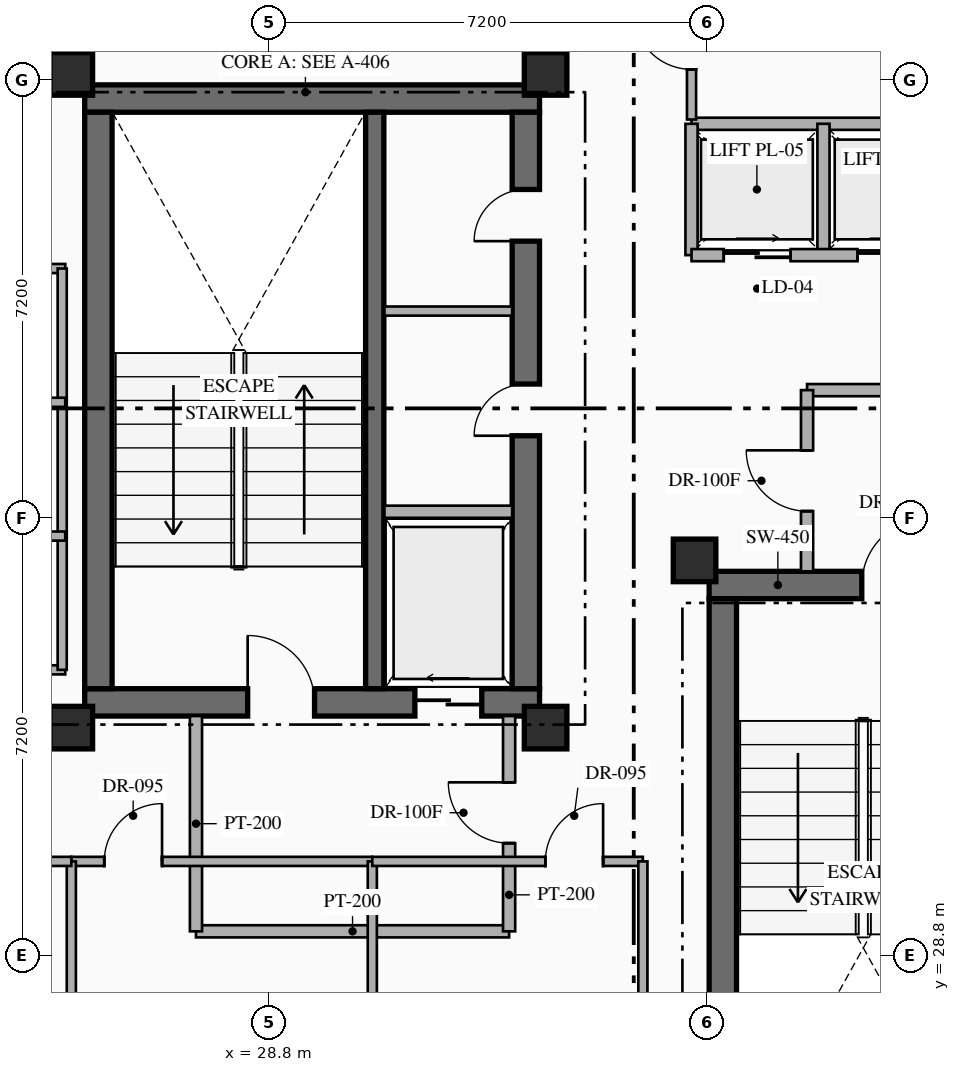
"""IFC4 building model, lengths in metres.
Left out: names, types, materials, properties, quantities, classifications, styles, units other than length and angle.
Written with IfcOpenShell. Run it as: python <this file> out.ifc"""

import sys

from ifc_helpers import new_model, si_unit, direction, frame, frame_2d, origin, origin_2d, place, context, subcontext, project, spatial, rectangle, hollow_rectangle, extrude, element, fill, save


model = new_model("IFC4")
c1 = context("Model", 3, precision=1e-05, world=origin(), true_north=direction((0.0, 1.0)))
c2 = subcontext(c1, "Body", "Model", "MODEL_VIEW")
j1 = project(units=[si_unit("LENGTHUNIT", "METRE"), si_unit("PLANEANGLEUNIT", "RADIAN")], contexts=[c1])
p1 = place(None, origin())
s1 = spatial("IfcSite", under=j1, at=p1, CompositionType="ELEMENT")
p2 = place(p1, origin())
s2 = spatial("IfcBuilding", under=s1, at=p2, CompositionType="ELEMENT")
p3 = place(p2, frame((0.0, 0.0, 223.95)))
s3 = spatial("IfcBuildingStorey", under=s2, at=p3, CompositionType="ELEMENT", Elevation=223.95)
p4 = place(p3, frame((25.77, 32.965, 0.0), z_axis=(0.0, 0.0, 1.0), x_axis=(1.0, 0.0, 0.0)))
e1 = element("IfcWall", 1, at=p4, inside=s3, PredefinedType="SHEAR", context=c2, shape_type="SweptSolid", body=[
    extrude(rectangle(XDim=7.48, YDim=0.45, at=frame_2d((3.74, 0.0))), origin(), (0.0, 0.0, 1.0), 3.6),
])
p5 = place(p4, frame((2.68, 0.0, 0.0)))
e2 = element("IfcOpeningElement", 2, at=p5, cuts=e1, PredefinedType="OPENING", context=c2, shape_type="SweptSolid", body=[
    extrude(rectangle(XDim=1.1, YDim=2.2, at=frame_2d((0.55, 1.1))), frame((0.0, 0.235, 0.0), z_axis=(0.0, -1.0, 0.0), x_axis=(1.0, 0.0, 0.0)), (0.0, 0.0, 1.0), 0.47),
])
p6 = place(p4, frame((5.43, 0.0, 0.0)))
e3 = element("IfcOpeningElement", 3, at=p6, cuts=e1, PredefinedType="OPENING", context=c2, shape_type="SweptSolid", body=[
    extrude(rectangle(XDim=1.1, YDim=2.15, at=frame_2d((0.55, 1.075))), frame((0.0, 0.235, 0.0), z_axis=(0.0, -1.0, 0.0), x_axis=(1.0, 0.0, 0.0)), (0.0, 0.0, 1.0), 0.47),
])
p7 = place(p3, frame((25.77, 42.895, 0.0), z_axis=(0.0, 0.0, 1.0), x_axis=(1.0, 0.0, 0.0)))
e4 = element("IfcWall", 4, at=p7, inside=s3, PredefinedType="SHEAR", context=c2, shape_type="SweptSolid", body=[
    extrude(rectangle(XDim=7.48, YDim=0.45, at=frame_2d((3.74, 0.0))), origin(), (0.0, 0.0, 1.0), 3.6),
])
p8 = place(p3, frame((25.995, 33.19, 0.0), z_axis=(0.0, 0.0, 1.0), x_axis=(0.0, 1.0, 0.0)))
e5 = element("IfcWall", 5, at=p8, inside=s3, PredefinedType="SHEAR", context=c2, shape_type="SweptSolid", body=[
    extrude(rectangle(XDim=9.48, YDim=0.45, at=frame_2d((4.74, 0.0))), origin(), (0.0, 0.0, 1.0), 3.6),
])
p9 = place(p3, frame((33.025, 33.19, 0.0), z_axis=(0.0, 0.0, 1.0), x_axis=(0.0, 1.0, 0.0)))
e6 = element("IfcWall", 6, at=p9, inside=s3, PredefinedType="SHEAR", context=c2, shape_type="SweptSolid", body=[
    extrude(rectangle(XDim=9.48, YDim=0.45, at=frame_2d((4.74, 0.0))), origin(), (0.0, 0.0, 1.0), 3.6),
])
p10 = place(p9, frame((4.16, 0.0, 0.0)))
e7 = element("IfcOpeningElement", 7, at=p10, cuts=e6, PredefinedType="OPENING", context=c2, shape_type="SweptSolid", body=[
    extrude(rectangle(XDim=0.85, YDim=2.08, at=frame_2d((0.425, 1.04))), frame((0.0, 0.235, 0.0), z_axis=(0.0, -1.0, 0.0), x_axis=(1.0, 0.0, 0.0)), (0.0, 0.0, 1.0), 0.47),
])
p11 = place(p9, frame((7.36, 0.0, 0.0)))
e8 = element("IfcOpeningElement", 8, at=p11, cuts=e6, PredefinedType="OPENING", context=c2, shape_type="SweptSolid", body=[
    extrude(rectangle(XDim=0.85, YDim=2.08, at=frame_2d((0.425, 1.04))), frame((0.0, 0.235, 0.0), z_axis=(0.0, -1.0, 0.0), x_axis=(1.0, 0.0, 0.0)), (0.0, 0.0, 1.0), 0.47),
])
p12 = place(p3, frame((30.54, 33.19, 0.0), z_axis=(0.0, 0.0, 1.0), x_axis=(0.0, 1.0, 0.0)))
e9 = element("IfcWall", 9, at=p12, inside=s3, PredefinedType="SHEAR", context=c2, shape_type="SweptSolid", body=[
    extrude(rectangle(XDim=9.48, YDim=0.3, at=frame_2d((4.74, 0.0))), origin(), (0.0, 0.0, 1.0), 3.6),
])
p13 = place(p3, frame((36.04, 34.895, 0.0), z_axis=(0.0, 0.0, 1.0), x_axis=(1.0, 0.0, 0.0)))
e10 = element("IfcWall", 10, at=p13, inside=s3, PredefinedType="SHEAR", context=c2, shape_type="SweptSolid", body=[
    extrude(rectangle(XDim=7.46, YDim=0.45, at=frame_2d((3.73, 0.0))), origin(), (0.0, 0.0, 1.0), 3.6),
])
p14 = place(p13, frame((2.51, 0.0, 0.0)))
e11 = element("IfcOpeningElement", 11, at=p14, cuts=e10, PredefinedType="OPENING", context=c2, shape_type="SweptSolid", body=[
    extrude(rectangle(XDim=1.1, YDim=2.2, at=frame_2d((0.55, 1.1))), frame((0.0, 0.235, 0.0), z_axis=(0.0, -1.0, 0.0), x_axis=(1.0, 0.0, 0.0)), (0.0, 0.0, 1.0), 0.47),
])
p15 = place(p13, frame((5.41, 0.0, 0.0)))
e12 = element("IfcOpeningElement", 12, at=p15, cuts=e10, PredefinedType="OPENING", context=c2, shape_type="SweptSolid", body=[
    extrude(rectangle(XDim=1.12, YDim=2.15, at=frame_2d((0.56, 1.075))), frame((0.0, 0.235, 0.0), z_axis=(0.0, -1.0, 0.0), x_axis=(1.0, 0.0, 0.0)), (0.0, 0.0, 1.0), 0.47),
])
p16 = place(p3, frame((36.265, 25.19, 0.0), z_axis=(0.0, 0.0, 1.0), x_axis=(0.0, 1.0, 0.0)))
e13 = element("IfcWall", 13, at=p16, inside=s3, PredefinedType="SHEAR", context=c2, shape_type="SweptSolid", body=[
    extrude(rectangle(XDim=9.48, YDim=0.45, at=frame_2d((4.74, 0.0))), origin(), (0.0, 0.0, 1.0), 3.6),
])
for number, where, z_axis, x_axis in (
    (14, (25.55, 32.55, 0.0), (0.0, 0.0, 1.0), (1.0, 0.0, 0.0)),
    (15, (33.35, 32.55, 0.0), (0.0, 0.0, 1.0), (1.0, 0.0, 0.0)),
    (16, (25.55, 43.3, 0.0), (0.0, 0.0, 1.0), (1.0, 0.0, 0.0)),
    (17, (33.35, 43.3, 0.0), (0.0, 0.0, 1.0), (1.0, 0.0, 0.0)),
    (18, (35.8, 35.3, 0.0), (0.0, 0.0, 1.0), (1.0, 0.0, 0.0)),
):
    element("IfcColumn", number, at=place(p3, frame(where, z_axis=z_axis, x_axis=x_axis)), inside=s3, PredefinedType="COLUMN", context=c2, shape_type="SweptSolid", body=[
        extrude(hollow_rectangle(XDim=0.7, YDim=0.7, WallThickness=0.028, at=origin_2d()), origin(), (0.0, 0.0, 1.0), 3.6),
    ])
p17 = place(p3, frame((30.7, 36.1, 0.0), z_axis=(0.0, 0.0, 1.0), x_axis=(1.0, 0.0, 0.0)))
e19 = element("IfcWall", 19, at=p17, inside=s3, PredefinedType="STANDARD", context=c2, shape_type="SweptSolid", body=[
    extrude(rectangle(XDim=2.1, YDim=0.2, at=frame_2d((1.05, 0.0))), origin(), (0.0, 0.0, 1.0), 3.35),
])
p18 = place(p3, frame((30.7, 39.4, 0.0), z_axis=(0.0, 0.0, 1.0), x_axis=(1.0, 0.0, 0.0)))
e20 = element("IfcWall", 20, at=p18, inside=s3, PredefinedType="PARTITIONING", context=c2, shape_type="SweptSolid", body=[
    extrude(rectangle(XDim=2.1, YDim=0.15, at=frame_2d((1.05, 0.0))), origin(), (0.0, 0.0, 1.0), 3.35),
])
p19 = place(p3, frame((27.6, 29.2, 0.0), z_axis=(0.0, 0.0, 1.0), x_axis=(1.0, 0.0, 0.0)))
e21 = element("IfcWall", 21, at=p19, inside=s3, PredefinedType="STANDARD", context=c2, shape_type="SweptSolid", body=[
    extrude(rectangle(XDim=5.15, YDim=0.2, at=frame_2d((2.575, 0.0))), origin(), (0.0, 0.0, 1.0), 3.35),
])
p20 = place(p3, frame((27.6, 29.2, 0.0), z_axis=(0.0, 0.0, 1.0), x_axis=(0.0, 1.0, 0.0)))
e22 = element("IfcWall", 22, at=p20, inside=s3, PredefinedType="STANDARD", context=c2, shape_type="SweptSolid", body=[
    extrude(rectangle(XDim=3.54, YDim=0.2, at=frame_2d((1.77, 0.0))), origin(), (0.0, 0.0, 1.0), 3.35),
])
p21 = place(p3, frame((32.75, 29.2, 0.0), z_axis=(0.0, 0.0, 1.0), x_axis=(0.0, 1.0, 0.0)))
e23 = element("IfcWall", 23, at=p21, inside=s3, PredefinedType="STANDARD", context=c2, shape_type="SweptSolid", body=[
    extrude(rectangle(XDim=3.54, YDim=0.2, at=frame_2d((1.77, 0.0))), origin(), (0.0, 0.0, 1.0), 3.35),
])
p22 = place(p21, frame((1.45, 0.0, 0.0)))
e24 = element("IfcOpeningElement", 24, at=p22, cuts=e23, PredefinedType="OPENING", context=c2, shape_type="SweptSolid", body=[
    extrude(rectangle(XDim=1.0, YDim=2.2, at=frame_2d((0.5, 1.1))), frame((0.0, 0.11, 0.0), z_axis=(0.0, -1.0, 0.0), x_axis=(1.0, 0.0, 0.0)), (0.0, 0.0, 1.0), 0.22),
])
p23 = place(p3, frame((37.65, 38.1, 0.0), z_axis=(0.0, 0.0, 1.0), x_axis=(1.0, 0.0, 0.0)))
e25 = element("IfcWall", 25, at=p23, inside=s3, PredefinedType="STANDARD", context=c2, shape_type="SweptSolid", body=[
    extrude(rectangle(XDim=5.3, YDim=0.2, at=frame_2d((2.65, 0.0))), origin(), (0.0, 0.0, 1.0), 3.35),
])
p24 = place(p3, frame((37.65, 35.12, 0.0), z_axis=(0.0, 0.0, 1.0), x_axis=(0.0, 1.0, 0.0)))
e26 = element("IfcWall", 26, at=p24, inside=s3, PredefinedType="STANDARD", context=c2, shape_type="SweptSolid", body=[
    extrude(rectangle(XDim=2.98, YDim=0.2, at=frame_2d((1.49, 0.0))), origin(), (0.0, 0.0, 1.0), 3.35),
])
p25 = place(p24, frame((0.99, 0.0, 0.0)))
e27 = element("IfcOpeningElement", 27, at=p25, cuts=e26, PredefinedType="OPENING", context=c2, shape_type="SweptSolid", body=[
    extrude(rectangle(XDim=1.0, YDim=2.2, at=frame_2d((0.5, 1.1))), frame((0.0, 0.11, 0.0), z_axis=(0.0, -1.0, 0.0), x_axis=(1.0, 0.0, 0.0)), (0.0, 0.0, 1.0), 0.22),
])
p26 = place(p3, frame((35.75, 42.48, 0.0), z_axis=(0.0, 0.0, 1.0), x_axis=(1.0, 0.0, 0.0)))
e28 = element("IfcWall", 28, at=p26, inside=s3, PredefinedType="STANDARD", context=c2, shape_type="SweptSolid", body=[
    extrude(rectangle(XDim=9.11, YDim=0.2, at=frame_2d((4.555, 0.0))), origin(), (0.0, 0.0, 1.0), 3.35),
])
for number, where, z_axis, x_axis in (
    (29, (35.75, 40.32, 0.0), (0.0, 0.0, 1.0), (0.0, 1.0, 0.0)),
    (30, (37.92, 40.32, 0.0), (0.0, 0.0, 1.0), (0.0, 1.0, 0.0)),
):
    element("IfcWall", number, at=place(p3, frame(where, z_axis=z_axis, x_axis=x_axis)), inside=s3, PredefinedType="STANDARD", context=c2, shape_type="SweptSolid", body=[
        extrude(rectangle(XDim=2.16, YDim=0.2, at=frame_2d((1.08, 0.0))), origin(), (0.0, 0.0, 1.0), 3.35),
    ])
p27 = place(p3, frame((35.75, 40.32, 0.0), z_axis=(0.0, 0.0, 1.0), x_axis=(1.0, 0.0, 0.0)))
e31 = element("IfcWall", 31, at=p27, inside=s3, PredefinedType="STANDARD", context=c2, shape_type="SweptSolid", body=[
    extrude(rectangle(XDim=9.11, YDim=0.2, at=frame_2d((4.555, 0.0))), origin(), (0.0, 0.0, 1.0), 3.35),
])
p28 = place(p27, frame((0.53, 0.0, 0.0)))
e32 = element("IfcOpeningElement", 32, at=p28, cuts=e31, PredefinedType="OPENING", context=c2, shape_type="SweptSolid", body=[
    extrude(rectangle(XDim=1.1, YDim=2.18, at=frame_2d((0.55, 1.09))), frame((0.0, 0.11, 0.0), z_axis=(0.0, -1.0, 0.0), x_axis=(1.0, 0.0, 0.0)), (0.0, 0.0, 1.0), 0.22),
])
p29 = place(p27, frame((2.73, 0.0, 0.0)))
e33 = element("IfcOpeningElement", 33, at=p29, cuts=e31, PredefinedType="OPENING", context=c2, shape_type="SweptSolid", body=[
    extrude(rectangle(XDim=1.1, YDim=2.18, at=frame_2d((0.55, 1.09))), frame((0.0, 0.11, 0.0), z_axis=(0.0, -1.0, 0.0), x_axis=(1.0, 0.0, 0.0)), (0.0, 0.0, 1.0), 0.22),
])
p30 = place(p27, frame((4.93, 0.0, 0.0)))
e34 = element("IfcOpeningElement", 34, at=p30, cuts=e31, PredefinedType="OPENING", context=c2, shape_type="SweptSolid", body=[
    extrude(rectangle(XDim=1.1, YDim=2.18, at=frame_2d((0.55, 1.09))), frame((0.0, 0.11, 0.0), z_axis=(0.0, -1.0, 0.0), x_axis=(1.0, 0.0, 0.0)), (0.0, 0.0, 1.0), 0.22),
])
p31 = place(p27, frame((7.13, 0.0, 0.0)))
e35 = element("IfcOpeningElement", 35, at=p31, cuts=e31, PredefinedType="OPENING", context=c2, shape_type="SweptSolid", body=[
    extrude(rectangle(XDim=1.1, YDim=2.18, at=frame_2d((0.55, 1.09))), frame((0.0, 0.11, 0.0), z_axis=(0.0, -1.0, 0.0), x_axis=(1.0, 0.0, 0.0)), (0.0, 0.0, 1.0), 0.22),
])
for number, where, z_axis, x_axis in (
    (36, (22.15, 33.5, 0.0), (0.0, 0.0, 1.0), (1.0, 0.0, 0.0)),
    (37, (22.15, 40.1, 0.0), (0.0, 0.0, 1.0), (1.0, 0.0, 0.0)),
):
    element("IfcWall", number, at=place(p3, frame(where, z_axis=z_axis, x_axis=x_axis)), inside=s3, PredefinedType="PARTITIONING", context=c2, shape_type="SweptSolid", body=[
        extrude(rectangle(XDim=3.3, YDim=0.15, at=frame_2d((1.65, 0.0))), origin(), (0.0, 0.0, 1.0), 3.35),
    ])
p32 = place(p3, frame((25.4, 33.5, 0.0), z_axis=(0.0, 0.0, 1.0), x_axis=(0.0, 1.0, 0.0)))
e38 = element("IfcWall", 38, at=p32, inside=s3, PredefinedType="PARTITIONING", context=c2, shape_type="SweptSolid", body=[
    extrude(rectangle(XDim=6.6, YDim=0.15, at=frame_2d((3.3, 0.0))), origin(), (0.0, 0.0, 1.0), 3.35),
])
for number, where, z_axis, x_axis in (
    (39, (22.15, 35.7, 0.0), (0.0, 0.0, 1.0), (1.0, 0.0, 0.0)),
    (40, (22.15, 37.9, 0.0), (0.0, 0.0, 1.0), (1.0, 0.0, 0.0)),
):
    element("IfcWall", number, at=place(p3, frame(where, z_axis=z_axis, x_axis=x_axis)), inside=s3, PredefinedType="PARTITIONING", context=c2, shape_type="SweptSolid", body=[
        extrude(rectangle(XDim=3.3, YDim=0.15, at=frame_2d((1.65, 0.0))), origin(), (0.0, 0.0, 1.0), 3.35),
    ])
p33 = place(p3, frame((25.55, 30.35, 0.0), z_axis=(0.0, 0.0, 1.0), x_axis=(1.0, 0.0, 0.0)))
e41 = element("IfcWall", 41, at=p33, inside=s3, PredefinedType="PARTITIONING", context=c2, shape_type="SweptSolid", body=[
    extrude(rectangle(XDim=4.95, YDim=0.15, at=frame_2d((2.475, 0.0))), origin(), (0.0, 0.0, 1.0), 3.35),
])
p34 = place(p33, frame((0.542, 0.0, 0.0)))
e42 = element("IfcOpeningElement", 42, at=p34, cuts=e41, PredefinedType="OPENING", context=c2, shape_type="SweptSolid", body=[
    extrude(rectangle(XDim=0.95, YDim=2.15, at=frame_2d((0.475, 1.075))), frame((0.0, 0.085, 0.0), z_axis=(0.0, -1.0, 0.0), x_axis=(1.0, 0.0, 0.0)), (0.0, 0.0, 1.0), 0.17),
])
p35 = place(p3, frame((25.55, 23.2, 0.0), z_axis=(0.0, 0.0, 1.0), x_axis=(0.0, 1.0, 0.0)))
e43 = element("IfcWall", 43, at=p35, inside=s3, PredefinedType="PARTITIONING", context=c2, shape_type="SweptSolid", body=[
    extrude(rectangle(XDim=7.15, YDim=0.15, at=frame_2d((3.575, 0.0))), origin(), (0.0, 0.0, 1.0), 2.757),
])
p36 = place(p3, frame((30.5, 23.2, 0.0), z_axis=(0.0, 0.0, 1.0), x_axis=(0.0, 1.0, 0.0)))
e44 = element("IfcWall", 44, at=p36, inside=s3, PredefinedType="PARTITIONING", context=c2, shape_type="SweptSolid", body=[
    extrude(rectangle(XDim=7.15, YDim=0.15, at=frame_2d((3.575, 0.0))), origin(), (0.0, 0.0, 1.0), 3.35),
])
p37 = place(p3, frame((30.5, 30.35, 0.0), z_axis=(0.0, 0.0, 1.0), x_axis=(1.0, 0.0, 0.0)))
e45 = element("IfcWall", 45, at=p37, inside=s3, PredefinedType="PARTITIONING", context=c2, shape_type="SweptSolid", body=[
    extrude(rectangle(XDim=4.45, YDim=0.15, at=frame_2d((2.225, 0.0))), origin(), (0.0, 0.0, 1.0), 3.35),
])
p38 = place(p37, frame((2.846, 0.0, 0.0)))
e46 = element("IfcOpeningElement", 46, at=p38, cuts=e45, PredefinedType="OPENING", context=c2, shape_type="SweptSolid", body=[
    extrude(rectangle(XDim=0.95, YDim=2.15, at=frame_2d((0.475, 1.075))), frame((0.0, 0.085, 0.0), z_axis=(0.0, -1.0, 0.0), x_axis=(1.0, 0.0, 0.0)), (0.0, 0.0, 1.0), 0.17),
])
p39 = place(p3, frame((34.95, 23.2, 0.0), z_axis=(0.0, 0.0, 1.0), x_axis=(0.0, 1.0, 0.0)))
e47 = element("IfcWall", 47, at=p39, inside=s3, PredefinedType="PARTITIONING", context=c2, shape_type="SweptSolid", body=[
    extrude(rectangle(XDim=7.15, YDim=0.15, at=frame_2d((3.575, 0.0))), origin(), (0.0, 0.0, 1.0), 3.35),
])
p40 = place(p3, frame((22.25, 30.35, 0.0), z_axis=(0.0, 0.0, 1.0), x_axis=(1.0, 0.0, 0.0)))
e48 = element("IfcWall", 48, at=p40, inside=s3, PredefinedType="PARTITIONING", context=c2, shape_type="SweptSolid", body=[
    extrude(rectangle(XDim=3.3, YDim=0.15, at=frame_2d((1.65, 0.0))), origin(), (0.0, 0.0, 1.0), 3.35),
])
p41 = place(p40, frame((1.2, 0.0, 0.0)))
e49 = element("IfcOpeningElement", 49, at=p41, cuts=e48, PredefinedType="OPENING", context=c2, shape_type="SweptSolid", body=[
    extrude(rectangle(XDim=0.9, YDim=2.15, at=frame_2d((0.45, 1.075))), frame((0.0, 0.085, 0.0), z_axis=(0.0, -1.0, 0.0), x_axis=(1.0, 0.0, 0.0)), (0.0, 0.0, 1.0), 0.17),
])
p42 = place(p3, frame((35.75, 42.55, 0.0), z_axis=(0.0, 0.0, 1.0), x_axis=(0.0, 1.0, 0.0)))
e50 = element("IfcWall", 50, at=p42, inside=s3, PredefinedType="PARTITIONING", context=c2, shape_type="SweptSolid", body=[
    extrude(rectangle(XDim=2.6, YDim=0.15, at=frame_2d((1.3, 0.0))), origin(), (0.0, 0.0, 1.0), 3.35),
])
p43 = place(p42, frame((0.825, 0.0, 0.0)))
e51 = element("IfcOpeningElement", 51, at=p43, cuts=e50, PredefinedType="OPENING", context=c2, shape_type="SweptSolid", body=[
    extrude(rectangle(XDim=0.95, YDim=2.15, at=frame_2d((0.475, 1.075))), frame((0.0, 0.085, 0.0), z_axis=(0.0, -1.0, 0.0), x_axis=(1.0, 0.0, 0.0)), (0.0, 0.0, 1.0), 0.17),
])
p44 = place(p5, origin())
e52 = element("IfcDoor", 52, at=p44, inside=s3, OperationType="SINGLE_SWING_LEFT", PredefinedType="DOOR", context=c2, shape_type="SweptSolid", body=[
    extrude(rectangle(XDim=1.1, YDim=2.2, at=frame_2d((0.55, 1.1))), frame((0.0, 0.025, 0.0), z_axis=(0.0, -1.0, 0.0), x_axis=(1.0, 0.0, 0.0)), (0.0, 0.0, 1.0), 0.05),
])
fill(e2, e52)
p45 = place(p6, origin())
e53 = element("IfcDoor", 53, at=p45, inside=s3, OperationType="SLIDING_TO_LEFT", PredefinedType="USERDEFINED", context=c2, shape_type="SweptSolid", body=[
    extrude(rectangle(XDim=1.1, YDim=2.15, at=frame_2d((0.55, 1.075))), frame((0.0, 0.025, 0.0), z_axis=(0.0, -1.0, 0.0), x_axis=(1.0, 0.0, 0.0)), (0.0, 0.0, 1.0), 0.05),
])
fill(e3, e53)
p46 = place(p14, origin())
e54 = element("IfcDoor", 54, at=p46, inside=s3, OperationType="SINGLE_SWING_RIGHT", PredefinedType="DOOR", context=c2, shape_type="SweptSolid", body=[
    extrude(rectangle(XDim=1.1, YDim=2.2, at=frame_2d((0.55, 1.1))), frame((0.0, 0.025, 0.0), z_axis=(0.0, -1.0, 0.0), x_axis=(1.0, 0.0, 0.0)), (0.0, 0.0, 1.0), 0.05),
])
fill(e11, e54)
p47 = place(p10, origin())
e55 = element("IfcDoor", 55, at=p47, inside=s3, OperationType="SINGLE_SWING_LEFT", PredefinedType="DOOR", context=c2, shape_type="SweptSolid", body=[
    extrude(rectangle(XDim=0.85, YDim=2.08, at=frame_2d((0.425, 1.04))), frame((0.0, 0.025, 0.0), z_axis=(0.0, -1.0, 0.0), x_axis=(1.0, 0.0, 0.0)), (0.0, 0.0, 1.0), 0.05),
])
fill(e7, e55)
p48 = place(p11, origin())
e56 = element("IfcDoor", 56, at=p48, inside=s3, OperationType="SINGLE_SWING_LEFT", PredefinedType="DOOR", context=c2, shape_type="SweptSolid", body=[
    extrude(rectangle(XDim=0.85, YDim=2.08, at=frame_2d((0.425, 1.04))), frame((0.0, 0.025, 0.0), z_axis=(0.0, -1.0, 0.0), x_axis=(1.0, 0.0, 0.0)), (0.0, 0.0, 1.0), 0.05),
])
fill(e8, e56)
p49 = place(p22, origin())
e57 = element("IfcDoor", 57, at=p49, inside=s3, OperationType="SINGLE_SWING_RIGHT", PredefinedType="DOOR", context=c2, shape_type="SweptSolid", body=[
    extrude(rectangle(XDim=1.0, YDim=2.2, at=frame_2d((0.5, 1.1))), frame((0.0, 0.025, 0.0), z_axis=(0.0, -1.0, 0.0), x_axis=(1.0, 0.0, 0.0)), (0.0, 0.0, 1.0), 0.05),
])
fill(e24, e57)
p50 = place(p25, origin())
e58 = element("IfcDoor", 58, at=p50, inside=s3, OperationType="SINGLE_SWING_RIGHT", PredefinedType="DOOR", context=c2, shape_type="SweptSolid", body=[
    extrude(rectangle(XDim=1.0, YDim=2.2, at=frame_2d((0.5, 1.1))), frame((0.0, 0.025, 0.0), z_axis=(0.0, -1.0, 0.0), x_axis=(1.0, 0.0, 0.0)), (0.0, 0.0, 1.0), 0.05),
])
fill(e27, e58)
p51 = place(p28, origin())
e59 = element("IfcDoor", 59, at=p51, inside=s3, OperationType="SLIDING_TO_RIGHT", PredefinedType="USERDEFINED", context=c2, shape_type="SweptSolid", body=[
    extrude(rectangle(XDim=1.1, YDim=2.18, at=frame_2d((0.55, 1.09))), frame((0.0, 0.025, 0.0), z_axis=(0.0, -1.0, 0.0), x_axis=(1.0, 0.0, 0.0)), (0.0, 0.0, 1.0), 0.05),
])
fill(e32, e59)
p52 = place(p29, origin())
e60 = element("IfcDoor", 60, at=p52, inside=s3, OperationType="SLIDING_TO_RIGHT", PredefinedType="USERDEFINED", context=c2, shape_type="SweptSolid", body=[
    extrude(rectangle(XDim=1.1, YDim=2.18, at=frame_2d((0.55, 1.09))), frame((0.0, 0.025, 0.0), z_axis=(0.0, -1.0, 0.0), x_axis=(1.0, 0.0, 0.0)), (0.0, 0.0, 1.0), 0.05),
])
fill(e33, e60)
p53 = place(p34, origin())
e61 = element("IfcDoor", 61, at=p53, inside=s3, OperationType="SINGLE_SWING_RIGHT", PredefinedType="DOOR", context=c2, shape_type="SweptSolid", body=[
    extrude(rectangle(XDim=0.95, YDim=2.15, at=frame_2d((0.475, 1.075))), frame((0.0, 0.025, 0.0), z_axis=(0.0, -1.0, 0.0), x_axis=(1.0, 0.0, 0.0)), (0.0, 0.0, 1.0), 0.05),
])
fill(e42, e61)
p54 = place(p38, origin())
e62 = element("IfcDoor", 62, at=p54, inside=s3, OperationType="SINGLE_SWING_RIGHT", PredefinedType="DOOR", context=c2, shape_type="SweptSolid", body=[
    extrude(rectangle(XDim=0.95, YDim=2.15, at=frame_2d((0.475, 1.075))), frame((0.0, 0.025, 0.0), z_axis=(0.0, -1.0, 0.0), x_axis=(1.0, 0.0, 0.0)), (0.0, 0.0, 1.0), 0.05),
])
fill(e46, e62)
p55 = place(p43, origin())
e63 = element("IfcDoor", 63, at=p55, inside=s3, OperationType="SINGLE_SWING_RIGHT", PredefinedType="DOOR", context=c2, shape_type="SweptSolid", body=[
    extrude(rectangle(XDim=0.95, YDim=2.15, at=frame_2d((0.475, 1.075))), frame((0.0, 0.025, 0.0), z_axis=(0.0, -1.0, 0.0), x_axis=(1.0, 0.0, 0.0)), (0.0, 0.0, 1.0), 0.05),
])
fill(e51, e63)
save(model, sys.argv[1])
